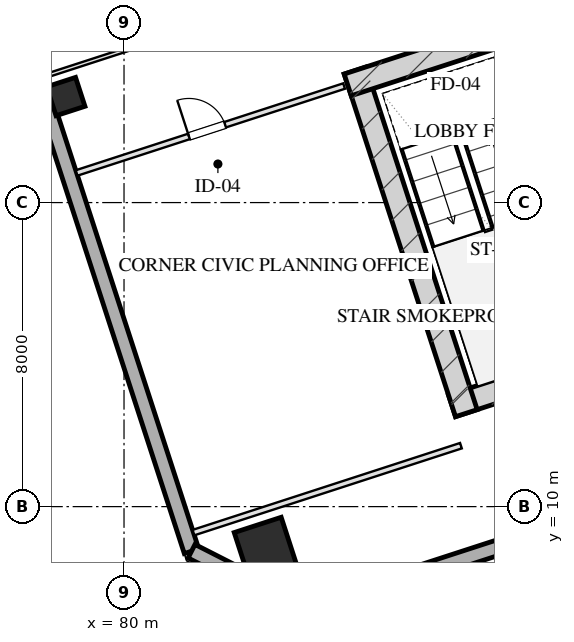
"""IFC4 building model, lengths in metres.
Left out: names, types, materials, properties, quantities, classifications, styles, units other than length and angle.
Written with IfcOpenShell. Run it as: python <this file> out.ifc"""

import sys

from ifc_helpers import new_model, si_unit, direction, frame, frame_2d, origin, origin_2d, place, context, subcontext, project, spatial, rectangle, hollow_rectangle, extrude, element, fill, save


model = new_model("IFC4")
c1 = context("Model", 3, precision=1e-05, world=origin(), true_north=direction((0.0, 1.0)))
c2 = subcontext(c1, "Body", "Model", "MODEL_VIEW")
j1 = project(units=[si_unit("LENGTHUNIT", "METRE"), si_unit("PLANEANGLEUNIT", "RADIAN")], contexts=[c1])
p1 = place(None, origin())
s1 = spatial("IfcSite", under=j1, at=p1, CompositionType="ELEMENT")
p2 = place(p1, origin())
s2 = spatial("IfcBuilding", under=s1, at=p2, CompositionType="ELEMENT")
p3 = place(p2, frame((0.0, 0.0, 146.05)))
s3 = spatial("IfcBuildingStorey", under=s2, at=p3, CompositionType="ELEMENT", Elevation=146.05)
p4 = place(p3, frame((88.63, 12.652, 0.0), z_axis=(0.0, 0.0, 1.0), x_axis=(0.95105714907, 0.309015046886, 0.0)))
e1 = element("IfcWall", 1, at=p4, inside=s3, PredefinedType="SHEAR", context=c2, shape_type="SweptSolid", body=[
    extrude(rectangle(XDim=16.4, YDim=0.6, at=frame_2d((8.2, 0.0))), origin(), (0.0, 0.0, 1.0), 3.45),
])
p5 = place(p3, frame((86.078, 21.475, 0.0), z_axis=(0.0, 0.0, 1.0), x_axis=(0.309017938678, -0.951056209472, 0.0)))
e2 = element("IfcWall", 2, at=p5, inside=s3, PredefinedType="SHEAR", context=c2, shape_type="SweptSolid", body=[
    extrude(rectangle(XDim=9.48, YDim=0.6, at=frame_2d((4.74, 0.0))), origin(), (0.0, 0.0, 1.0), 3.45),
])
p6 = place(p3, frame((85.886, 21.097, 0.0), z_axis=(0.0, 0.0, 1.0), x_axis=(0.951068073652, 0.308981422225, 0.0)))
e3 = element("IfcWall", 3, at=p6, inside=s3, PredefinedType="SHEAR", context=c2, shape_type="SweptSolid", body=[
    extrude(rectangle(XDim=4.22, YDim=0.6, at=frame_2d((2.11, 0.0))), origin(), (0.0, 0.0, 1.0), 3.45),
])
p7 = place(p3, frame((83.719, 8.901, 0.0), z_axis=(0.0, 0.0, 1.0), x_axis=(0.951056516295, 0.309016994375, 0.0)))
e4 = element("IfcColumn", 4, at=p7, inside=s3, PredefinedType="COLUMN", context=c2, shape_type="SweptSolid", body=[
    extrude(hollow_rectangle(XDim=1.3, YDim=1.3, WallThickness=0.045, at=origin_2d()), origin(), (0.0, 0.0, 1.0), 3.451),
])
p8 = place(p3, frame((78.468, 20.79, 0.0), z_axis=(0.0, 0.0, 1.0), x_axis=(0.951056516295, 0.309016994375, 0.0)))
e5 = element("IfcColumn", 5, at=p8, inside=s3, PredefinedType="COLUMN", context=c2, shape_type="SweptSolid", body=[
    extrude(hollow_rectangle(XDim=0.8, YDim=0.8, WallThickness=0.028, at=origin_2d()), origin(), (0.0, 0.0, 1.0), 3.451),
])
p9 = place(p3, frame((81.776, 8.827, 0.0), z_axis=(0.0, 0.0, 1.0), x_axis=(-0.309014228706, 0.951057414911, 0.0)))
e6 = element("IfcWall", 6, at=p9, inside=s3, PredefinedType="SOLIDWALL", context=c2, shape_type="SweptSolid", body=[
    extrude(rectangle(XDim=42.8, YDim=0.4, at=frame_2d((21.4, 0.0))), origin(), (0.0, 0.0, 1.0), 2.61),
])
p10 = place(p9, frame((17.733, 0.0, 0.0)))
e7 = element("IfcOpeningElement", 7, at=p10, cuts=e6, PredefinedType="OPENING", context=c2, shape_type="SweptSolid", body=[
    extrude(rectangle(XDim=1.1, YDim=2.15, at=frame_2d((0.55, 1.075))), frame((0.0, 0.21, 0.0), z_axis=(0.0, -1.0, 0.0), x_axis=(1.0, 0.0, 0.0)), (0.0, 0.0, 1.0), 0.42),
])
p11 = place(p3, frame((109.908, 15.444, 0.0), z_axis=(0.0, 0.0, 1.0), x_axis=(-0.951057580055, -0.30901372044, 0.0)))
e8 = element("IfcWall", 8, at=p11, inside=s3, PredefinedType="SOLIDWALL", context=c2, shape_type="SweptSolid", body=[
    extrude(rectangle(XDim=26.4, YDim=0.4, at=frame_2d((13.2, 0.0))), origin(), (0.0, 0.0, 1.0), 2.61),
])
p12 = place(p3, frame((84.801, 7.286, 0.0), z_axis=(0.0, 0.0, 1.0), x_axis=(-0.891020832027, 0.453962417932, 0.0)))
e9 = element("IfcWall", 9, at=p12, inside=s3, PredefinedType="SOLIDWALL", context=c2, shape_type="SweptSolid", body=[
    extrude(rectangle(XDim=3.394, YDim=0.4, at=frame_2d((1.697, 0.0))), origin(), (0.0, 0.0, 1.0), 2.61),
])
p13 = place(p3, frame((81.828, 9.316, 0.0), z_axis=(0.0, 0.0, 1.0), x_axis=(0.95105128112, 0.309033106124, 0.0)))
e10 = element("IfcWall", 10, at=p13, inside=s3, PredefinedType="PARTITIONING", context=c2, shape_type="SweptSolid", body=[
    extrude(rectangle(XDim=7.4, YDim=0.15, at=frame_2d((3.7, 0.0))), origin(), (0.0, 0.0, 1.0), 3.175),
])
p14 = place(p3, frame((78.753, 18.78, 0.0), z_axis=(0.0, 0.0, 1.0), x_axis=(0.951060977215, 0.309003264738, 0.0)))
e11 = element("IfcWall", 11, at=p14, inside=s3, PredefinedType="PARTITIONING", context=c2, shape_type="SweptSolid", body=[
    extrude(rectangle(XDim=7.4, YDim=0.15, at=frame_2d((3.7, 0.0))), origin(), (0.0, 0.0, 1.0), 3.175),
])
p15 = place(p14, frame((3.108, 0.0, 0.0)))
e12 = element("IfcOpeningElement", 12, at=p15, cuts=e11, PredefinedType="OPENING", context=c2, shape_type="SweptSolid", body=[
    extrude(rectangle(XDim=1.0, YDim=2.05, at=frame_2d((0.5, 1.025))), frame((0.0, 0.085, 0.0), z_axis=(0.0, -1.0, 0.0), x_axis=(1.0, 0.0, 0.0)), (0.0, 0.0, 1.0), 0.17),
])
p16 = place(p3, frame((77.925, 21.328, 0.0), z_axis=(0.0, 0.0, 1.0), x_axis=(0.951059431056, 0.309008023519, 0.0)))
e13 = element("IfcWall", 13, at=p16, inside=s3, PredefinedType="MOVABLE", context=c2, shape_type="SweptSolid", body=[
    extrude(rectangle(XDim=5.8, YDim=0.1, at=frame_2d((2.9, 0.0))), origin(), (0.0, 0.0, 1.0), 3.175),
])
p17 = place(p15, origin())
e14 = element("IfcDoor", 14, at=p17, inside=s3, OperationType="SINGLE_SWING_LEFT", PredefinedType="DOOR", context=c2, shape_type="SweptSolid", body=[
    extrude(rectangle(XDim=1.0, YDim=2.05, at=frame_2d((0.5, 1.025))), frame((0.0, 0.025, 0.0), z_axis=(0.0, -1.0, 0.0), x_axis=(1.0, 0.0, 0.0)), (0.0, 0.0, 1.0), 0.05),
])
fill(e12, e14)
save(model, sys.argv[1])
